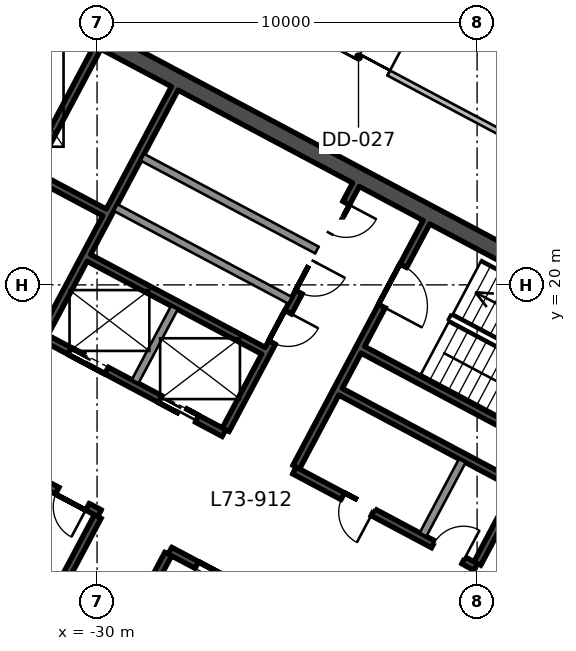
"""IFC4 building model, lengths in metres.
Left out: names, types, materials, properties, quantities, classifications, styles, units other than length and angle.
Written with IfcOpenShell. Run it as: python <this file> out.ifc"""

import sys

from ifc_helpers import new_model, si_unit, direction, frame, frame_2d, origin, place, context, subcontext, project, spatial, rectangle, extrude, element, fill, save


model = new_model("IFC4")
c1 = context("Model", 3, precision=1e-05, world=origin(), true_north=direction((0.0, 1.0)))
c2 = subcontext(c1, "Body", "Model", "MODEL_VIEW")
j1 = project(units=[si_unit("LENGTHUNIT", "METRE"), si_unit("PLANEANGLEUNIT", "RADIAN")], contexts=[c1])
p1 = place(None, origin())
s1 = spatial("IfcSite", under=j1, at=p1, CompositionType="ELEMENT")
p2 = place(p1, origin())
s2 = spatial("IfcBuilding", under=s1, at=p2, CompositionType="ELEMENT")
p3 = place(p2, frame((0.0, 0.0, 320.4)))
s3 = spatial("IfcBuildingStorey", under=s2, at=p3, CompositionType="ELEMENT", Elevation=320.4)
p4 = place(p3, frame((-13.771, 18.138, 0.0), z_axis=(0.0, 0.0, 1.0), x_axis=(-0.469467968382, -0.882949504028, 0.0)))
e1 = element("IfcWall", 1, at=p4, inside=s3, PredefinedType="SHEAR", context=c2, shape_type="SweptSolid", body=[
    extrude(rectangle(XDim=19.1, YDim=0.45, at=frame_2d((9.55, 0.0))), origin(), (0.0, 0.0, 1.0), 3.9),
])
p5 = place(p4, frame((6.55, 0.0, 0.0)))
e2 = element("IfcOpeningElement", 2, at=p5, cuts=e1, PredefinedType="OPENING", context=c2, shape_type="SweptSolid", body=[
    extrude(rectangle(XDim=2.4, YDim=2.4, at=frame_2d((1.2, 1.2))), frame((0.0, 0.235, 0.0), z_axis=(0.0, -1.0, 0.0), x_axis=(1.0, 0.0, 0.0)), (0.0, 0.0, 1.0), 0.47),
])
p6 = place(p3, frame((-14.076, 18.045, 0.0), z_axis=(0.0, 0.0, 1.0), x_axis=(-0.882947755831, 0.46947125628, 0.0)))
e3 = element("IfcWall", 3, at=p6, inside=s3, PredefinedType="SHEAR", context=c2, shape_type="SweptSolid", body=[
    extrude(rectangle(XDim=20.2, YDim=0.45, at=frame_2d((10.1, 0.0))), origin(), (0.0, 0.0, 1.0), 3.9),
])
p7 = place(p3, frame((-18.96, 14.611, 0.0), z_axis=(0.0, 0.0, 1.0), x_axis=(-0.4694473164, -0.882960484464, 0.0)))
e4 = element("IfcWall", 4, at=p7, inside=s3, PredefinedType="SHEAR", context=c2, shape_type="SweptSolid", body=[
    extrude(rectangle(XDim=2.2, YDim=0.2, at=frame_2d((1.1, 0.0))), origin(), (0.0, 0.0, 1.0), 3.9),
])
p8 = place(p3, frame((-20.39, 15.372, 0.0), z_axis=(0.0, 0.0, 1.0), x_axis=(-0.4694473164, -0.882960484464, 0.0)))
e5 = element("IfcWall", 5, at=p8, inside=s3, PredefinedType="SOLIDWALL", context=c2, shape_type="SweptSolid", body=[
    extrude(rectangle(XDim=2.2, YDim=0.2, at=frame_2d((1.1, 0.0))), origin(), (0.0, 0.0, 1.0), 3.9),
])
p9 = place(p3, frame((-21.333, 21.649, 0.0), z_axis=(0.0, 0.0, 1.0), x_axis=(-0.469494272526, -0.882935517501, 0.0)))
e6 = element("IfcWall", 6, at=p9, inside=s3, PredefinedType="SHEAR", context=c2, shape_type="SweptSolid", body=[
    extrude(rectangle(XDim=7.3, YDim=0.2, at=frame_2d((3.65, 0.0))), origin(), (0.0, 0.0, 1.0), 3.9),
])
p10 = place(p9, frame((1.3, 0.0, 0.0)))
e7 = element("IfcOpeningElement", 7, at=p10, cuts=e6, PredefinedType="OPENING", context=c2, shape_type="SweptSolid", body=[
    extrude(rectangle(XDim=1.2, YDim=2.1, at=frame_2d((0.6, 1.05))), frame((0.0, 0.11, 0.0), z_axis=(0.0, -1.0, 0.0), x_axis=(1.0, 0.0, 0.0)), (0.0, 0.0, 1.0), 0.22),
])
p11 = place(p3, frame((-28.128, 12.917, 0.0), z_axis=(0.0, 0.0, 1.0), x_axis=(-0.469454336211, -0.882956752176, 0.0)))
e8 = element("IfcWall", 8, at=p11, inside=s3, PredefinedType="SHEAR", context=c2, shape_type="SweptSolid", body=[
    extrude(rectangle(XDim=7.3, YDim=0.2, at=frame_2d((3.65, 0.0))), origin(), (0.0, 0.0, 1.0), 3.9),
])
p12 = place(p11, frame((3.35, 0.0, 0.0)))
e9 = element("IfcOpeningElement", 9, at=p12, cuts=e8, PredefinedType="OPENING", context=c2, shape_type="SweptSolid", body=[
    extrude(rectangle(XDim=0.9, YDim=2.1, at=frame_2d((0.45, 1.05))), frame((0.0, 0.11, 0.0), z_axis=(0.0, -1.0, 0.0), x_axis=(1.0, 0.0, 0.0)), (0.0, 0.0, 1.0), 0.22),
])
p13 = place(p11, frame((5.85, 0.0, 0.0)))
e10 = element("IfcOpeningElement", 10, at=p13, cuts=e8, PredefinedType="OPENING", context=c2, shape_type="SweptSolid", body=[
    extrude(rectangle(XDim=0.9, YDim=2.1, at=frame_2d((0.45, 1.05))), frame((0.0, 0.11, 0.0), z_axis=(0.0, -1.0, 0.0), x_axis=(1.0, 0.0, 0.0)), (0.0, 0.0, 1.0), 0.22),
])
p14 = place(p3, frame((-23.188, 22.635, 0.0), z_axis=(0.0, 0.0, 1.0), x_axis=(-0.469454336211, -0.882956752176, 0.0)))
e11 = element("IfcWall", 11, at=p14, inside=s3, PredefinedType="SHEAR", context=c2, shape_type="SweptSolid", body=[
    extrude(rectangle(XDim=7.3, YDim=0.2, at=frame_2d((3.65, 0.0))), origin(), (0.0, 0.0, 1.0), 3.9),
])
p15 = place(p14, frame((0.55, 0.0, 0.0)))
e12 = element("IfcOpeningElement", 12, at=p15, cuts=e11, PredefinedType="OPENING", context=c2, shape_type="SweptSolid", body=[
    extrude(rectangle(XDim=0.9, YDim=2.1, at=frame_2d((0.45, 1.05))), frame((0.0, 0.11, 0.0), z_axis=(0.0, -1.0, 0.0), x_axis=(1.0, 0.0, 0.0)), (0.0, 0.0, 1.0), 0.22),
])
p16 = place(p14, frame((2.3, 0.0, 0.0)))
e13 = element("IfcOpeningElement", 13, at=p16, cuts=e11, PredefinedType="OPENING", context=c2, shape_type="SweptSolid", body=[
    extrude(rectangle(XDim=0.9, YDim=2.1, at=frame_2d((0.45, 1.05))), frame((0.0, 0.11, 0.0), z_axis=(0.0, -1.0, 0.0), x_axis=(1.0, 0.0, 0.0)), (0.0, 0.0, 1.0), 0.22),
])
p17 = place(p14, frame((3.8, 0.0, 0.0)))
e14 = element("IfcOpeningElement", 14, at=p17, cuts=e11, PredefinedType="OPENING", context=c2, shape_type="SweptSolid", body=[
    extrude(rectangle(XDim=0.9, YDim=2.1, at=frame_2d((0.45, 1.05))), frame((0.0, 0.11, 0.0), z_axis=(0.0, -1.0, 0.0), x_axis=(1.0, 0.0, 0.0)), (0.0, 0.0, 1.0), 0.22),
])
p18 = place(p3, frame((-29.982, 13.903, 0.0), z_axis=(0.0, 0.0, 1.0), x_axis=(-0.469454336211, -0.882956752176, 0.0)))
e15 = element("IfcWall", 15, at=p18, inside=s3, PredefinedType="SHEAR", context=c2, shape_type="SweptSolid", body=[
    extrude(rectangle(XDim=7.3, YDim=0.2, at=frame_2d((3.65, 0.0))), origin(), (0.0, 0.0, 1.0), 3.9),
])
p19 = place(p18, frame((4.8, 0.0, 0.0)))
e16 = element("IfcOpeningElement", 16, at=p19, cuts=e15, PredefinedType="OPENING", context=c2, shape_type="SweptSolid", body=[
    extrude(rectangle(XDim=1.2, YDim=2.1, at=frame_2d((0.6, 1.05))), frame((0.0, 0.11, 0.0), z_axis=(0.0, -1.0, 0.0), x_axis=(1.0, 0.0, 0.0)), (0.0, 0.0, 1.0), 0.22),
])
p20 = place(p3, frame((-27.966, 19.4, 0.0), z_axis=(0.0, 0.0, 1.0), x_axis=(-0.4694473164, -0.882960484464, 0.0)))
e17 = element("IfcWall", 17, at=p20, inside=s3, PredefinedType="SOLIDWALL", context=c2, shape_type="SweptSolid", body=[
    extrude(rectangle(XDim=2.2, YDim=0.2, at=frame_2d((1.1, 0.0))), origin(), (0.0, 0.0, 1.0), 3.9),
])
p21 = place(p3, frame((-27.955, 25.171, 0.0), z_axis=(0.0, 0.0, 1.0), x_axis=(-0.469480409012, -0.88294288918, 0.0)))
e18 = element("IfcWall", 18, at=p21, inside=s3, PredefinedType="SHEAR", context=c2, shape_type="SweptSolid", body=[
    extrude(rectangle(XDim=7.3, YDim=0.2, at=frame_2d((3.65, 0.0))), origin(), (0.0, 0.0, 1.0), 3.9),
])
p22 = place(p3, frame((-29.986, 26.25, 0.0), z_axis=(0.0, 0.0, 1.0), x_axis=(-0.469494272526, -0.882935517501, 0.0)))
e19 = element("IfcWall", 19, at=p22, inside=s3, PredefinedType="SHEAR", context=c2, shape_type="SweptSolid", body=[
    extrude(rectangle(XDim=3.65, YDim=0.2, at=frame_2d((1.825, 0.0))), origin(), (0.0, 0.0, 1.0), 3.9),
])
p23 = place(p3, frame((-24.215, 20.917, 0.0), z_axis=(0.0, 0.0, 1.0), x_axis=(-0.882964314875, 0.469440111896, 0.0)))
e20 = element("IfcWall", 20, at=p23, inside=s3, PredefinedType="SOLIDWALL", context=c2, shape_type="SweptSolid", body=[
    extrude(rectangle(XDim=5.2, YDim=0.2, at=frame_2d((2.6, 0.0))), origin(), (0.0, 0.0, 1.0), 3.9),
])
p24 = place(p3, frame((-24.919, 19.592, 0.0), z_axis=(0.0, 0.0, 1.0), x_axis=(-0.882953967957, 0.469459572775, 0.0)))
e21 = element("IfcWall", 21, at=p24, inside=s3, PredefinedType="SOLIDWALL", context=c2, shape_type="SweptSolid", body=[
    extrude(rectangle(XDim=5.2, YDim=0.2, at=frame_2d((2.6, 0.0))), origin(), (0.0, 0.0, 1.0), 3.9),
])
p25 = place(p3, frame((-15.942, 14.536, 0.0), z_axis=(0.0, 0.0, 1.0), x_axis=(-0.882946947542, 0.469472776449, 0.0)))
e22 = element("IfcWall", 22, at=p25, inside=s3, PredefinedType="SHEAR", context=c2, shape_type="SweptSolid", body=[
    extrude(rectangle(XDim=8.0, YDim=0.2, at=frame_2d((4.0, 0.0))), origin(), (0.0, 0.0, 1.0), 3.9),
])
p26 = place(p3, frame((-29.804, 21.906, 0.0), z_axis=(0.0, 0.0, 1.0), x_axis=(-0.882960433586, 0.469447412093, 0.0)))
e23 = element("IfcWall", 23, at=p26, inside=s3, PredefinedType="SHEAR", context=c2, shape_type="SweptSolid", body=[
    extrude(rectangle(XDim=4.5, YDim=0.2, at=frame_2d((2.25, 0.0))), origin(), (0.0, 0.0, 1.0), 3.9),
])
p27 = place(p26, frame((2.65, 0.0, 0.0)))
e24 = element("IfcOpeningElement", 24, at=p27, cuts=e23, PredefinedType="OPENING", context=c2, shape_type="SweptSolid", body=[
    extrude(rectangle(XDim=1.4, YDim=2.4, at=frame_2d((0.7, 1.2))), frame((0.0, 0.11, 0.0), z_axis=(0.0, -1.0, 0.0), x_axis=(1.0, 0.0, 0.0)), (0.0, 0.0, 1.0), 0.22),
])
p28 = place(p3, frame((-16.529, 13.432, 0.0), z_axis=(0.0, 0.0, 1.0), x_axis=(-0.88295287151, 0.469461634952, 0.0)))
e25 = element("IfcWall", 25, at=p28, inside=s3, PredefinedType="SHEAR", context=c2, shape_type="SweptSolid", body=[
    extrude(rectangle(XDim=8.0, YDim=0.2, at=frame_2d((4.0, 0.0))), origin(), (0.0, 0.0, 1.0), 3.9),
])
p29 = place(p3, frame((-25.623, 18.268, 0.0), z_axis=(0.0, 0.0, 1.0), x_axis=(-0.882953967957, 0.469459572775, 0.0)))
e26 = element("IfcWall", 26, at=p29, inside=s3, PredefinedType="SHEAR", context=c2, shape_type="SweptSolid", body=[
    extrude(rectangle(XDim=5.2, YDim=0.2, at=frame_2d((2.6, 0.0))), origin(), (0.0, 0.0, 1.0), 3.9),
])
p30 = place(p3, frame((-20.04, 12.581, 0.0), z_axis=(0.0, 0.0, 1.0), x_axis=(-0.882942972946, 0.469480251476, 0.0)))
e27 = element("IfcWall", 27, at=p30, inside=s3, PredefinedType="SHEAR", context=c2, shape_type="SweptSolid", body=[
    extrude(rectangle(XDim=5.4, YDim=0.2, at=frame_2d((2.7, 0.0))), origin(), (0.0, 0.0, 1.0), 3.9),
])
p31 = place(p30, frame((0.36, 0.0, 0.0)))
e28 = element("IfcOpeningElement", 28, at=p31, cuts=e27, PredefinedType="OPENING", context=c2, shape_type="SweptSolid", body=[
    extrude(rectangle(XDim=0.9, YDim=2.1, at=frame_2d((0.45, 1.05))), frame((0.0, 0.11, 0.0), z_axis=(0.0, -1.0, 0.0), x_axis=(1.0, 0.0, 0.0)), (0.0, 0.0, 1.0), 0.22),
])
p32 = place(p30, frame((3.06, 0.0, 0.0)))
e29 = element("IfcOpeningElement", 29, at=p32, cuts=e27, PredefinedType="OPENING", context=c2, shape_type="SweptSolid", body=[
    extrude(rectangle(XDim=0.9, YDim=2.1, at=frame_2d((0.45, 1.05))), frame((0.0, 0.11, 0.0), z_axis=(0.0, -1.0, 0.0), x_axis=(1.0, 0.0, 0.0)), (0.0, 0.0, 1.0), 0.22),
])
p33 = place(p3, frame((-26.662, 16.102, 0.0), z_axis=(0.0, 0.0, 1.0), x_axis=(-0.882940221191, 0.469485426614, 0.0)))
e30 = element("IfcWall", 30, at=p33, inside=s3, PredefinedType="SHEAR", context=c2, shape_type="SweptSolid", body=[
    extrude(rectangle(XDim=10.0, YDim=0.2, at=frame_2d((5.0, 0.0))), origin(), (0.0, 0.0, 1.0), 3.9),
])
p34 = place(p33, frame((6.3, 0.0, 0.0)))
e31 = element("IfcOpeningElement", 31, at=p34, cuts=e30, PredefinedType="OPENING", context=c2, shape_type="SweptSolid", body=[
    extrude(rectangle(XDim=1.2, YDim=2.1, at=frame_2d((0.6, 1.05))), frame((0.0, 0.11, 0.0), z_axis=(0.0, -1.0, 0.0), x_axis=(1.0, 0.0, 0.0)), (0.0, 0.0, 1.0), 0.22),
])
p35 = place(p33, frame((0.8, 0.0, 0.0)))
e32 = element("IfcOpeningElement", 32, at=p35, cuts=e30, PredefinedType="OPENING", context=c2, shape_type="SweptSolid", body=[
    extrude(rectangle(XDim=1.1, YDim=2.1, at=frame_2d((0.55, 1.05))), frame((0.0, 0.11, 0.0), z_axis=(0.0, -1.0, 0.0), x_axis=(1.0, 0.0, 0.0)), (0.0, 0.0, 1.0), 0.22),
])
p36 = place(p33, frame((3.5, 0.0, 0.0)))
e33 = element("IfcOpeningElement", 33, at=p36, cuts=e30, PredefinedType="OPENING", context=c2, shape_type="SweptSolid", body=[
    extrude(rectangle(XDim=1.1, YDim=2.1, at=frame_2d((0.55, 1.05))), frame((0.0, 0.11, 0.0), z_axis=(0.0, -1.0, 0.0), x_axis=(1.0, 0.0, 0.0)), (0.0, 0.0, 1.0), 0.22),
])
p37 = place(p3, frame((-19.252, 8.311, 0.0), z_axis=(0.0, 0.0, 1.0), x_axis=(-0.882955722218, 0.469456273365, 0.0)))
e34 = element("IfcWall", 34, at=p37, inside=s3, PredefinedType="SHEAR", context=c2, shape_type="SweptSolid", body=[
    extrude(rectangle(XDim=10.0, YDim=0.2, at=frame_2d((5.0, 0.0))), origin(), (0.0, 0.0, 1.0), 3.9),
])
p38 = place(p37, frame((2.1, 0.0, 0.0)))
e35 = element("IfcOpeningElement", 35, at=p38, cuts=e34, PredefinedType="OPENING", context=c2, shape_type="SweptSolid", body=[
    extrude(rectangle(XDim=1.2, YDim=2.1, at=frame_2d((0.6, 1.05))), frame((0.0, 0.11, 0.0), z_axis=(0.0, -1.0, 0.0), x_axis=(1.0, 0.0, 0.0)), (0.0, 0.0, 1.0), 0.22),
])
p39 = place(p37, frame((5.4, 0.0, 0.0)))
e36 = element("IfcOpeningElement", 36, at=p39, cuts=e34, PredefinedType="OPENING", context=c2, shape_type="SweptSolid", body=[
    extrude(rectangle(XDim=1.1, YDim=2.1, at=frame_2d((0.55, 1.05))), frame((0.0, 0.11, 0.0), z_axis=(0.0, -1.0, 0.0), x_axis=(1.0, 0.0, 0.0)), (0.0, 0.0, 1.0), 0.22),
])
p40 = place(p37, frame((8.1, 0.0, 0.0)))
e37 = element("IfcOpeningElement", 37, at=p40, cuts=e34, PredefinedType="OPENING", context=c2, shape_type="SweptSolid", body=[
    extrude(rectangle(XDim=1.1, YDim=2.1, at=frame_2d((0.55, 1.05))), frame((0.0, 0.11, 0.0), z_axis=(0.0, -1.0, 0.0), x_axis=(1.0, 0.0, 0.0)), (0.0, 0.0, 1.0), 0.22),
])
p41 = place(p3, frame((-29.935, 13.991, 0.0), z_axis=(0.0, 0.0, 1.0), x_axis=(-0.882952937579, 0.469461510692, 0.0)))
e38 = element("IfcWall", 38, at=p41, inside=s3, PredefinedType="SHEAR", context=c2, shape_type="SweptSolid", body=[
    extrude(rectangle(XDim=5.4, YDim=0.2, at=frame_2d((2.7, 0.0))), origin(), (0.0, 0.0, 1.0), 3.9),
])
p42 = place(p41, frame((0.36, 0.0, 0.0)))
e39 = element("IfcOpeningElement", 39, at=p42, cuts=e38, PredefinedType="OPENING", context=c2, shape_type="SweptSolid", body=[
    extrude(rectangle(XDim=0.9, YDim=2.1, at=frame_2d((0.45, 1.05))), frame((0.0, 0.11, 0.0), z_axis=(0.0, -1.0, 0.0), x_axis=(1.0, 0.0, 0.0)), (0.0, 0.0, 1.0), 0.22),
])
p43 = place(p41, frame((3.06, 0.0, 0.0)))
e40 = element("IfcOpeningElement", 40, at=p43, cuts=e38, PredefinedType="OPENING", context=c2, shape_type="SweptSolid", body=[
    extrude(rectangle(XDim=0.9, YDim=2.1, at=frame_2d((0.45, 1.05))), frame((0.0, 0.11, 0.0), z_axis=(0.0, -1.0, 0.0), x_axis=(1.0, 0.0, 0.0)), (0.0, 0.0, 1.0), 0.22),
])
p44 = place(p3, frame((-31.15, 11.919, 0.0), z_axis=(0.0, 0.0, 1.0), x_axis=(-0.882940221191, 0.469485426614, 0.0)))
e41 = element("IfcWall", 41, at=p44, inside=s3, PredefinedType="SHEAR", context=c2, shape_type="SweptSolid", body=[
    extrude(rectangle(XDim=8.0, YDim=0.2, at=frame_2d((4.0, 0.0))), origin(), (0.0, 0.0, 1.0), 3.9),
])
p45 = place(p3, frame((-48.947, 39.73, 0.0), z_axis=(0.0, 0.0, 1.0), x_axis=(0.882945454821, -0.469475583828, 0.0)))
e42 = element("IfcWall", 42, at=p45, inside=s3, PredefinedType="PARTITIONING", context=c2, shape_type="SweptSolid", body=[
    extrude(rectangle(XDim=55.436, YDim=0.15, at=frame_2d((27.718, 0.0))), origin(), (0.0, 0.0, 1.0), 3.54),
])
p46 = place(p45, frame((28.35, 0.0, 0.0)))
e43 = element("IfcOpeningElement", 43, at=p46, cuts=e42, PredefinedType="OPENING", context=c2, shape_type="SweptSolid", body=[
    extrude(rectangle(XDim=1.8, YDim=2.1, at=frame_2d((0.9, 1.05))), frame((0.0, 0.085, 0.0), z_axis=(0.0, -1.0, 0.0), x_axis=(1.0, 0.0, 0.0)), (0.0, 0.0, 1.0), 0.17),
])
p47 = place(p45, frame((26.7, 0.0, 0.0)))
e44 = element("IfcOpeningElement", 44, at=p47, cuts=e42, PredefinedType="OPENING", context=c2, shape_type="SweptSolid", body=[
    extrude(rectangle(XDim=1.0, YDim=2.1, at=frame_2d((0.5, 1.05))), frame((0.0, 0.085, 0.0), z_axis=(0.0, -1.0, 0.0), x_axis=(1.0, 0.0, 0.0)), (0.0, 0.0, 1.0), 0.17),
])
p48 = place(p45, frame((15.65, 0.0, 0.0)))
e45 = element("IfcOpeningElement", 45, at=p48, cuts=e42, PredefinedType="OPENING", context=c2, shape_type="SweptSolid", body=[
    extrude(rectangle(XDim=1.0, YDim=2.1, at=frame_2d((0.5, 1.05))), frame((0.0, 0.085, 0.0), z_axis=(0.0, -1.0, 0.0), x_axis=(1.0, 0.0, 0.0)), (0.0, 0.0, 1.0), 0.17),
])
p49 = place(p3, frame((-20.588, -0.379, 0.0), z_axis=(0.0, 0.0, 1.0), x_axis=(0.469489882812, 0.882937851685, 0.0)))
e46 = element("IfcWall", 46, at=p49, inside=s3, PredefinedType="PARTITIONING", context=c2, shape_type="SweptSolid", body=[
    extrude(rectangle(XDim=20.0, YDim=0.15, at=frame_2d((10.0, 0.0))), origin(), (0.0, 0.0, 1.0), 3.54),
])
p50 = place(p49, frame((9.55, 0.0, 0.0)))
e47 = element("IfcOpeningElement", 47, at=p50, cuts=e46, PredefinedType="OPENING", context=c2, shape_type="SweptSolid", body=[
    extrude(rectangle(XDim=1.0, YDim=2.1, at=frame_2d((0.5, 1.05))), frame((0.0, 0.085, 0.0), z_axis=(0.0, -1.0, 0.0), x_axis=(1.0, 0.0, 0.0)), (0.0, 0.0, 1.0), 0.17),
])
p51 = place(p10, origin())
e48 = element("IfcDoor", 48, at=p51, inside=s3, OperationType="SINGLE_SWING_RIGHT", PredefinedType="DOOR", context=c2, shape_type="SweptSolid", body=[
    extrude(rectangle(XDim=1.2, YDim=2.1, at=frame_2d((0.6, 1.05))), frame((0.0, 0.025, 0.0), z_axis=(0.0, -1.0, 0.0), x_axis=(1.0, 0.0, 0.0)), (0.0, 0.0, 1.0), 0.05),
])
fill(e7, e48)
p52 = place(p42, origin())
e49 = element("IfcDoor", 49, at=p52, inside=s3, OperationType="SINGLE_SWING_LEFT", PredefinedType="DOOR", context=c2, shape_type="SweptSolid", body=[
    extrude(rectangle(XDim=0.9, YDim=2.1, at=frame_2d((0.45, 1.05))), frame((0.0, 0.025, 0.0), z_axis=(0.0, -1.0, 0.0), x_axis=(1.0, 0.0, 0.0)), (0.0, 0.0, 1.0), 0.05),
])
fill(e39, e49)
p53 = place(p31, frame((0.9, 0.0, 0.0), z_axis=(0.0, 0.0, 1.0), x_axis=(-1.0, 0.0, 0.0)))
e50 = element("IfcDoor", 50, at=p53, inside=s3, OperationType="SINGLE_SWING_RIGHT", PredefinedType="DOOR", context=c2, shape_type="SweptSolid", body=[
    extrude(rectangle(XDim=0.9, YDim=2.1, at=frame_2d((0.45, 1.05))), frame((0.0, 0.025, 0.0), z_axis=(0.0, -1.0, 0.0), x_axis=(1.0, 0.0, 0.0)), (0.0, 0.0, 1.0), 0.05),
])
fill(e28, e50)
p54 = place(p32, origin())
e51 = element("IfcDoor", 51, at=p54, inside=s3, OperationType="SINGLE_SWING_LEFT", PredefinedType="DOOR", context=c2, shape_type="SweptSolid", body=[
    extrude(rectangle(XDim=0.9, YDim=2.1, at=frame_2d((0.45, 1.05))), frame((0.0, 0.025, 0.0), z_axis=(0.0, -1.0, 0.0), x_axis=(1.0, 0.0, 0.0)), (0.0, 0.0, 1.0), 0.05),
])
fill(e29, e51)
p55 = place(p40, origin())
e52 = element("IfcDoor", 52, at=p55, inside=s3, OperationType="DOUBLE_DOOR_SLIDING", PredefinedType="DOOR", context=c2, shape_type="SweptSolid", body=[
    extrude(rectangle(XDim=1.1, YDim=2.1, at=frame_2d((0.55, 1.05))), frame((0.0, 0.025, 0.0), z_axis=(0.0, -1.0, 0.0), x_axis=(1.0, 0.0, 0.0)), (0.0, 0.0, 1.0), 0.05),
])
fill(e37, e52)
p56 = place(p35, origin())
e53 = element("IfcDoor", 53, at=p56, inside=s3, OperationType="DOUBLE_DOOR_SLIDING", PredefinedType="DOOR", context=c2, shape_type="SweptSolid", body=[
    extrude(rectangle(XDim=1.1, YDim=2.1, at=frame_2d((0.55, 1.05))), frame((0.0, 0.025, 0.0), z_axis=(0.0, -1.0, 0.0), x_axis=(1.0, 0.0, 0.0)), (0.0, 0.0, 1.0), 0.05),
])
fill(e32, e53)
p57 = place(p36, origin())
e54 = element("IfcDoor", 54, at=p57, inside=s3, OperationType="DOUBLE_DOOR_SLIDING", PredefinedType="DOOR", context=c2, shape_type="SweptSolid", body=[
    extrude(rectangle(XDim=1.1, YDim=2.1, at=frame_2d((0.55, 1.05))), frame((0.0, 0.025, 0.0), z_axis=(0.0, -1.0, 0.0), x_axis=(1.0, 0.0, 0.0)), (0.0, 0.0, 1.0), 0.05),
])
fill(e33, e54)
p58 = place(p15, origin())
e55 = element("IfcDoor", 55, at=p58, inside=s3, OperationType="SINGLE_SWING_LEFT", PredefinedType="DOOR", context=c2, shape_type="SweptSolid", body=[
    extrude(rectangle(XDim=0.9, YDim=2.1, at=frame_2d((0.45, 1.05))), frame((0.0, 0.025, 0.0), z_axis=(0.0, -1.0, 0.0), x_axis=(1.0, 0.0, 0.0)), (0.0, 0.0, 1.0), 0.05),
])
fill(e12, e55)
p59 = place(p16, origin())
e56 = element("IfcDoor", 56, at=p59, inside=s3, OperationType="SINGLE_SWING_LEFT", PredefinedType="DOOR", context=c2, shape_type="SweptSolid", body=[
    extrude(rectangle(XDim=0.9, YDim=2.1, at=frame_2d((0.45, 1.05))), frame((0.0, 0.025, 0.0), z_axis=(0.0, -1.0, 0.0), x_axis=(1.0, 0.0, 0.0)), (0.0, 0.0, 1.0), 0.05),
])
fill(e13, e56)
p60 = place(p17, origin())
e57 = element("IfcDoor", 57, at=p60, inside=s3, OperationType="SINGLE_SWING_LEFT", PredefinedType="DOOR", context=c2, shape_type="SweptSolid", body=[
    extrude(rectangle(XDim=0.9, YDim=2.1, at=frame_2d((0.45, 1.05))), frame((0.0, 0.025, 0.0), z_axis=(0.0, -1.0, 0.0), x_axis=(1.0, 0.0, 0.0)), (0.0, 0.0, 1.0), 0.05),
])
fill(e14, e57)
p61 = place(p46, origin())
e58 = element("IfcDoor", 58, at=p61, inside=s3, OperationType="DOUBLE_DOOR_SINGLE_SWING", PredefinedType="DOOR", context=c2, shape_type="SweptSolid", body=[
    extrude(rectangle(XDim=1.8, YDim=2.1, at=frame_2d((0.9, 1.05))), frame((0.0, 0.025, 0.0), z_axis=(0.0, -1.0, 0.0), x_axis=(1.0, 0.0, 0.0)), (0.0, 0.0, 1.0), 0.05),
])
fill(e43, e58)
save(model, sys.argv[1])
